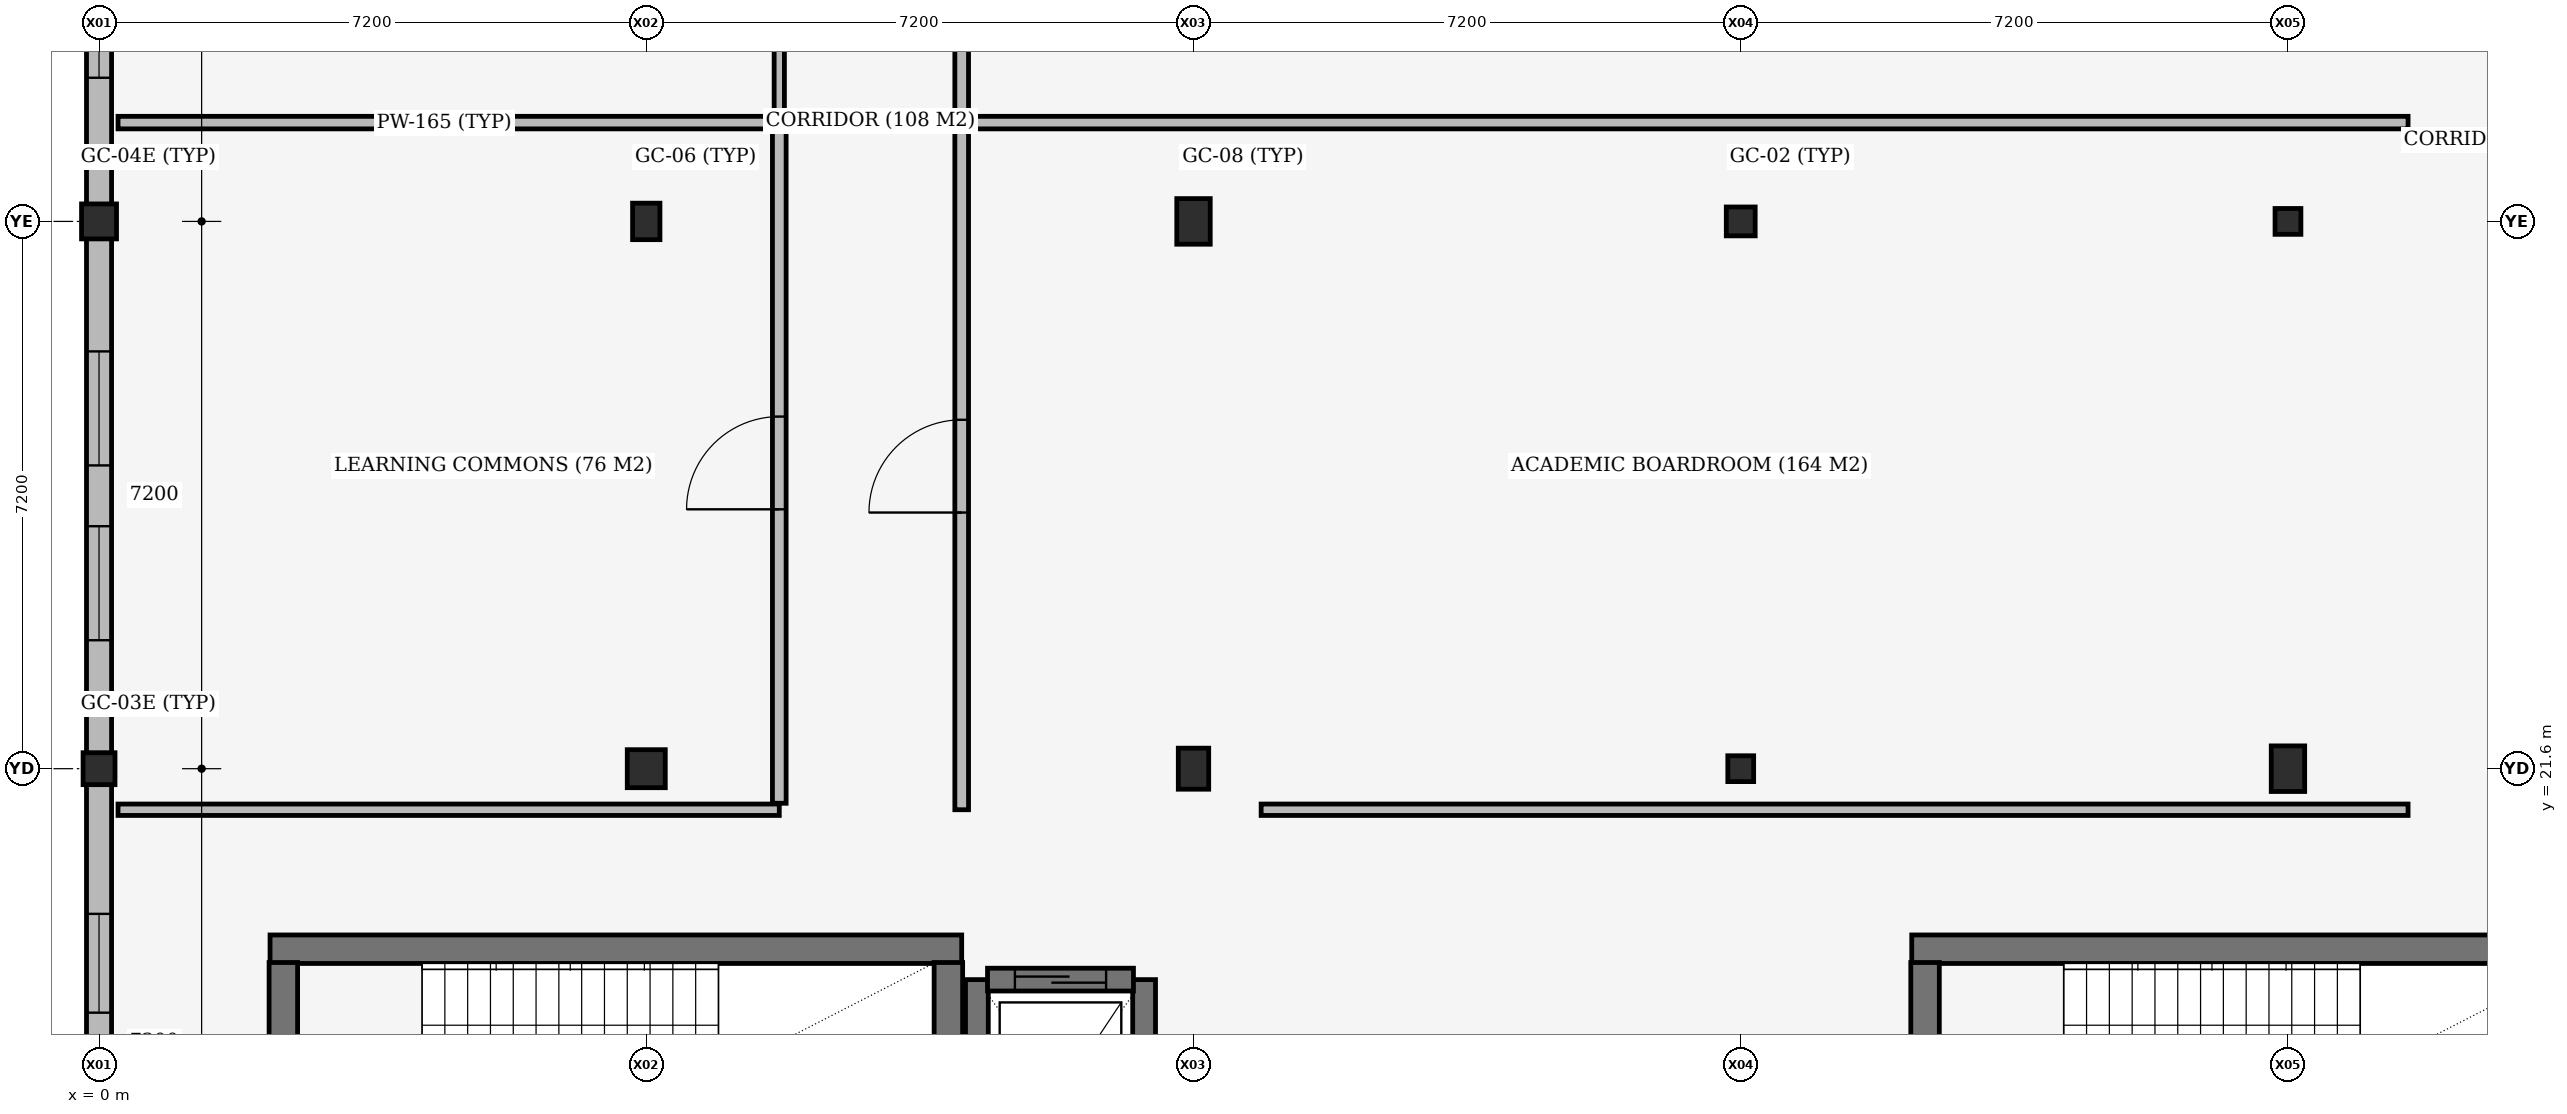
"""IFC4 building model, lengths in metres.
Left out: names, types, materials, properties, quantities, classifications, styles, units other than length and angle.
Written with IfcOpenShell. Run it as: python <this file> out.ifc"""

import sys

from ifc_helpers import new_model, si_unit, direction, frame, frame_2d, origin, origin_2d, place, context, subcontext, project, spatial, rectangle, extrude, element, fill, save


model = new_model("IFC4")
c1 = context("Model", 3, precision=1e-05, world=origin(), true_north=direction((0.0, 1.0)))
c2 = subcontext(c1, "Body", "Model", "MODEL_VIEW")
j1 = project(units=[si_unit("LENGTHUNIT", "METRE"), si_unit("PLANEANGLEUNIT", "RADIAN")], contexts=[c1])
p1 = place(None, origin())
s1 = spatial("IfcSite", under=j1, at=p1, CompositionType="ELEMENT")
p2 = place(p1, origin())
s2 = spatial("IfcBuilding", under=s1, at=p2, CompositionType="ELEMENT")
p3 = place(p2, frame((0.0, 0.0, 18.0)))
s3 = spatial("IfcBuildingStorey", under=s2, at=p3, CompositionType="ELEMENT", Elevation=18.0)
p4 = place(p3, frame((0.0, 21.6, 0.0), z_axis=(0.0, 0.0, 1.0), x_axis=(1.0, 0.0, 0.0)))
e1 = element("IfcColumn", 1, at=p4, inside=s3, PredefinedType="COLUMN", context=c2, shape_type="SweptSolid", body=[
    extrude(rectangle(XDim=0.42, YDim=0.42, at=origin_2d()), origin(), (0.0, 0.0, 1.0), 3.935),
])
p5 = place(p3, frame((0.0, 28.8, 0.0), z_axis=(0.0, 0.0, 1.0), x_axis=(1.0, 0.0, 0.0)))
e2 = element("IfcColumn", 2, at=p5, inside=s3, PredefinedType="COLUMN", context=c2, shape_type="SweptSolid", body=[
    extrude(rectangle(XDim=0.46, YDim=0.46, at=origin_2d()), origin(), (0.0, 0.0, 1.0), 3.935),
])
p6 = place(p3, frame((7.2, 21.6, 0.0), z_axis=(0.0, 0.0, 1.0), x_axis=(1.0, 0.0, 0.0)))
e3 = element("IfcColumn", 3, at=p6, inside=s3, PredefinedType="COLUMN", context=c2, shape_type="SweptSolid", body=[
    extrude(rectangle(XDim=0.5, YDim=0.5, at=origin_2d()), origin(), (0.0, 0.0, 1.0), 3.935),
])
p7 = place(p3, frame((7.2, 28.8, 0.0), z_axis=(0.0, 0.0, 1.0), x_axis=(1.0, 0.0, 0.0)))
e4 = element("IfcColumn", 4, at=p7, inside=s3, PredefinedType="COLUMN", context=c2, shape_type="SweptSolid", body=[
    extrude(rectangle(XDim=0.36, YDim=0.48, at=origin_2d()), origin(), (0.0, 0.0, 1.0), 3.935),
])
p8 = place(p3, frame((14.4, 21.6, 0.0), z_axis=(0.0, 0.0, 1.0), x_axis=(1.0, 0.0, 0.0)))
e5 = element("IfcColumn", 5, at=p8, inside=s3, PredefinedType="COLUMN", context=c2, shape_type="SweptSolid", body=[
    extrude(rectangle(XDim=0.4, YDim=0.54, at=origin_2d()), origin(), (0.0, 0.0, 1.0), 3.935),
])
p9 = place(p3, frame((14.4, 28.8, 0.0), z_axis=(0.0, 0.0, 1.0), x_axis=(1.0, 0.0, 0.0)))
e6 = element("IfcColumn", 6, at=p9, inside=s3, PredefinedType="COLUMN", context=c2, shape_type="SweptSolid", body=[
    extrude(rectangle(XDim=0.44, YDim=0.6, at=origin_2d()), origin(), (0.0, 0.0, 1.0), 3.935),
])
p10 = place(p3, frame((21.6, 21.6, 0.0), z_axis=(0.0, 0.0, 1.0), x_axis=(1.0, 0.0, 0.0)))
e7 = element("IfcColumn", 7, at=p10, inside=s3, PredefinedType="COLUMN", context=c2, shape_type="SweptSolid", body=[
    extrude(rectangle(XDim=0.34, YDim=0.34, at=origin_2d()), origin(), (0.0, 0.0, 1.0), 3.935),
])
p11 = place(p3, frame((21.6, 28.8, 0.0), z_axis=(0.0, 0.0, 1.0), x_axis=(1.0, 0.0, 0.0)))
e8 = element("IfcColumn", 8, at=p11, inside=s3, PredefinedType="COLUMN", context=c2, shape_type="SweptSolid", body=[
    extrude(rectangle(XDim=0.38, YDim=0.38, at=origin_2d()), origin(), (0.0, 0.0, 1.0), 3.935),
])
p12 = place(p3, frame((28.8, 21.6, 0.0), z_axis=(0.0, 0.0, 1.0), x_axis=(1.0, 0.0, 0.0)))
e9 = element("IfcColumn", 9, at=p12, inside=s3, PredefinedType="COLUMN", context=c2, shape_type="SweptSolid", body=[
    extrude(rectangle(XDim=0.44, YDim=0.6, at=origin_2d()), origin(), (0.0, 0.0, 1.0), 3.935),
])
p13 = place(p3, frame((28.8, 28.8, 0.0), z_axis=(0.0, 0.0, 1.0), x_axis=(1.0, 0.0, 0.0)))
e10 = element("IfcColumn", 10, at=p13, inside=s3, PredefinedType="COLUMN", context=c2, shape_type="SweptSolid", body=[
    extrude(rectangle(XDim=0.34, YDim=0.34, at=origin_2d()), origin(), (0.0, 0.0, 1.0), 3.935),
])
p14 = place(p3, frame((11.35, 19.225, 0.0), z_axis=(0.0, 0.0, 1.0), x_axis=(-1.0, 0.0, 0.0)))
e11 = element("IfcWall", 11, at=p14, inside=s3, PredefinedType="SHEAR", context=c2, shape_type="SweptSolid", body=[
    extrude(rectangle(XDim=9.1, YDim=0.375, at=frame_2d((4.55, 0.0))), origin(), (0.0, 0.0, 1.0), 3.935),
])
p15 = place(p3, frame((11.175, 15.6, 0.0), z_axis=(0.0, 0.0, 1.0), x_axis=(0.0, 1.0, 0.0)))
e12 = element("IfcWall", 12, at=p15, inside=s3, PredefinedType="SHEAR", context=c2, shape_type="SweptSolid", body=[
    extrude(rectangle(XDim=3.45, YDim=0.375, at=frame_2d((1.725, 0.0))), origin(), (0.0, 0.0, 1.0), 3.935),
])
p16 = place(p3, frame((32.95, 19.225, 0.0), z_axis=(0.0, 0.0, 1.0), x_axis=(-1.0, 0.0, 0.0)))
e13 = element("IfcWall", 13, at=p16, inside=s3, PredefinedType="SHEAR", context=c2, shape_type="SweptSolid", body=[
    extrude(rectangle(XDim=9.1, YDim=0.375, at=frame_2d((4.55, 0.0))), origin(), (0.0, 0.0, 1.0), 3.935),
])
for number, where, z_axis, x_axis in (
    (14, (11.55, 18.825, 0.0), (0.0, 0.0, 1.0), (0.0, -1.0, 0.0)),
    (15, (13.75, 15.825, 0.0), (0.0, 0.0, 1.0), (0.0, 1.0, 0.0)),
):
    element("IfcWall", number, at=place(p3, frame(where, z_axis=z_axis, x_axis=x_axis)), inside=s3, PredefinedType="SHEAR", context=c2, shape_type="SweptSolid", body=[
        extrude(rectangle(XDim=3.0, YDim=0.3, at=frame_2d((1.5, 0.0))), origin(), (0.0, 0.0, 1.0), 3.935),
    ])
p17 = place(p3, frame((0.0, 14.582, 0.0), z_axis=(0.0, 0.0, 1.0), x_axis=(0.0, 1.0, 0.0)))
e16 = element("IfcWall", 16, at=p17, inside=s3, PredefinedType="STANDARD", context=c2, shape_type="SweptSolid", body=[
    extrude(rectangle(XDim=6.816, YDim=0.33, at=frame_2d((3.408, 0.0))), origin(), (0.0, 0.0, 1.0), 3.295),
])
p18 = place(p17, frame((1.708, 0.0, 0.95)))
e17 = element("IfcOpeningElement", 17, at=p18, cuts=e16, PredefinedType="OPENING", context=c2, shape_type="SweptSolid", body=[
    extrude(rectangle(XDim=1.3, YDim=1.8, at=frame_2d((0.65, 0.9))), frame((0.0, 0.175, 0.0), z_axis=(0.0, -1.0, 0.0), x_axis=(1.0, 0.0, 0.0)), (0.0, 0.0, 1.0), 0.35),
])
p19 = place(p17, frame((3.808, 0.0, 0.95)))
e18 = element("IfcOpeningElement", 18, at=p19, cuts=e16, PredefinedType="OPENING", context=c2, shape_type="SweptSolid", body=[
    extrude(rectangle(XDim=1.3, YDim=1.8, at=frame_2d((0.65, 0.9))), frame((0.0, 0.175, 0.0), z_axis=(0.0, -1.0, 0.0), x_axis=(1.0, 0.0, 0.0)), (0.0, 0.0, 1.0), 0.35),
])
p20 = place(p3, frame((0.0, 21.802, 0.0), z_axis=(0.0, 0.0, 1.0), x_axis=(0.0, 1.0, 0.0)))
e19 = element("IfcWall", 19, at=p20, inside=s3, PredefinedType="STANDARD", context=c2, shape_type="SweptSolid", body=[
    extrude(rectangle(XDim=6.776, YDim=0.33, at=frame_2d((3.388, 0.0))), origin(), (0.0, 0.0, 1.0), 3.255),
])
p21 = place(p20, frame((1.488, 0.0, 0.95)))
e20 = element("IfcOpeningElement", 20, at=p21, cuts=e19, PredefinedType="OPENING", context=c2, shape_type="SweptSolid", body=[
    extrude(rectangle(XDim=1.5, YDim=1.8, at=frame_2d((0.75, 0.9))), frame((0.0, 0.175, 0.0), z_axis=(0.0, -1.0, 0.0), x_axis=(1.0, 0.0, 0.0)), (0.0, 0.0, 1.0), 0.35),
])
p22 = place(p20, frame((3.788, 0.0, 0.95)))
e21 = element("IfcOpeningElement", 21, at=p22, cuts=e19, PredefinedType="OPENING", context=c2, shape_type="SweptSolid", body=[
    extrude(rectangle(XDim=1.5, YDim=1.8, at=frame_2d((0.75, 0.9))), frame((0.0, 0.175, 0.0), z_axis=(0.0, -1.0, 0.0), x_axis=(1.0, 0.0, 0.0)), (0.0, 0.0, 1.0), 0.35),
])
p23 = place(p3, frame((0.0, 29.022, 0.0), z_axis=(0.0, 0.0, 1.0), x_axis=(0.0, 1.0, 0.0)))
e22 = element("IfcWall", 22, at=p23, inside=s3, PredefinedType="STANDARD", context=c2, shape_type="SweptSolid", body=[
    extrude(rectangle(XDim=6.736, YDim=0.33, at=frame_2d((3.368, 0.0))), origin(), (0.0, 0.0, 1.0), 3.195),
])
p24 = place(p23, frame((1.668, 0.0, 0.95)))
e23 = element("IfcOpeningElement", 23, at=p24, cuts=e22, PredefinedType="OPENING", context=c2, shape_type="SweptSolid", body=[
    extrude(rectangle(XDim=1.3, YDim=1.8, at=frame_2d((0.65, 0.9))), frame((0.0, 0.175, 0.0), z_axis=(0.0, -1.0, 0.0), x_axis=(1.0, 0.0, 0.0)), (0.0, 0.0, 1.0), 0.35),
])
p25 = place(p23, frame((3.768, 0.0, 0.95)))
e24 = element("IfcOpeningElement", 24, at=p25, cuts=e22, PredefinedType="OPENING", context=c2, shape_type="SweptSolid", body=[
    extrude(rectangle(XDim=1.3, YDim=1.8, at=frame_2d((0.65, 0.9))), frame((0.0, 0.175, 0.0), z_axis=(0.0, -1.0, 0.0), x_axis=(1.0, 0.0, 0.0)), (0.0, 0.0, 1.0), 0.35),
])
p26 = place(p3, frame((2.425, 19.05, 0.0), z_axis=(0.0, 0.0, 1.0), x_axis=(0.0, -1.0, 0.0)))
e25 = element("IfcWall", 25, at=p26, inside=s3, PredefinedType="SHEAR", context=c2, shape_type="SweptSolid", body=[
    extrude(rectangle(XDim=3.45, YDim=0.375, at=frame_2d((1.725, 0.0))), origin(), (0.0, 0.0, 1.0), 3.935),
])
p27 = place(p26, frame((1.035, 0.0, 0.0)))
e26 = element("IfcOpeningElement", 26, at=p27, cuts=e25, PredefinedType="OPENING", context=c2, shape_type="SweptSolid", body=[
    extrude(rectangle(XDim=1.38, YDim=2.2, at=frame_2d((0.69, 1.1))), frame((0.0, 0.198, 0.0), z_axis=(0.0, -1.0, 0.0), x_axis=(1.0, 0.0, 0.0)), (0.0, 0.0, 1.0), 0.395),
])
p28 = place(p3, frame((24.025, 19.05, 0.0), z_axis=(0.0, 0.0, 1.0), x_axis=(0.0, -1.0, 0.0)))
e27 = element("IfcWall", 27, at=p28, inside=s3, PredefinedType="SHEAR", context=c2, shape_type="SweptSolid", body=[
    extrude(rectangle(XDim=3.45, YDim=0.375, at=frame_2d((1.725, 0.0))), origin(), (0.0, 0.0, 1.0), 3.935),
])
p29 = place(p28, frame((1.035, 0.0, 0.0)))
e28 = element("IfcOpeningElement", 28, at=p29, cuts=e27, PredefinedType="OPENING", context=c2, shape_type="SweptSolid", body=[
    extrude(rectangle(XDim=1.38, YDim=2.2, at=frame_2d((0.69, 1.1))), frame((0.0, 0.198, 0.0), z_axis=(0.0, -1.0, 0.0), x_axis=(1.0, 0.0, 0.0)), (0.0, 0.0, 1.0), 0.395),
])
p30 = place(p3, frame((11.69, 18.825, 0.0), z_axis=(0.0, 0.0, 1.0), x_axis=(1.0, 0.0, 0.0)))
e29 = element("IfcWall", 29, at=p30, inside=s3, PredefinedType="SHEAR", context=c2, shape_type="SweptSolid", body=[
    extrude(rectangle(XDim=1.92, YDim=0.3, at=frame_2d((0.96, 0.0))), origin(), (0.0, 0.0, 1.0), 3.935),
])
p31 = place(p30, frame((0.36, 0.0, 0.0)))
e30 = element("IfcOpeningElement", 30, at=p31, cuts=e29, PredefinedType="OPENING", context=c2, shape_type="SweptSolid", body=[
    extrude(rectangle(XDim=1.2, YDim=2.1, at=frame_2d((0.6, 1.05))), frame((0.0, 0.16, 0.0), z_axis=(0.0, -1.0, 0.0), x_axis=(1.0, 0.0, 0.0)), (0.0, 0.0, 1.0), 0.32),
])
p32 = place(p3, frame((0.25, 21.06, 0.0), z_axis=(0.0, 0.0, 1.0), x_axis=(1.0, 0.0, 0.0)))
e31 = element("IfcWall", 31, at=p32, inside=s3, PredefinedType="PARTITIONING", context=c2, shape_type="SweptSolid", body=[
    extrude(rectangle(XDim=8.7, YDim=0.15, at=frame_2d((4.35, 0.0))), origin(), (0.0, 0.0, 1.0), 3.485),
])
p33 = place(p3, frame((8.95, 21.145, 0.0), z_axis=(0.0, 0.0, 1.0), x_axis=(0.0, 1.0, 0.0)))
e32 = element("IfcWall", 32, at=p33, inside=s3, PredefinedType="PARTITIONING", context=c2, shape_type="SweptSolid", body=[
    extrude(rectangle(XDim=8.955, YDim=0.18, at=frame_2d((4.478, 0.0))), origin(), (0.0, 0.0, 1.0), 3.255),
])
p34 = place(p33, frame((3.867, 0.0, 0.0)))
e33 = element("IfcOpeningElement", 33, at=p34, cuts=e32, PredefinedType="OPENING", context=c2, shape_type="SweptSolid", body=[
    extrude(rectangle(XDim=1.22, YDim=2.25, at=frame_2d((0.61, 1.125))), frame((0.0, 0.1, 0.0), z_axis=(0.0, -1.0, 0.0), x_axis=(1.0, 0.0, 0.0)), (0.0, 0.0, 1.0), 0.2),
])
p35 = place(p3, frame((0.25, 30.1, 0.0), z_axis=(0.0, 0.0, 1.0), x_axis=(1.0, 0.0, 0.0)))
e34 = element("IfcWall", 34, at=p35, inside=s3, PredefinedType="PARTITIONING", context=c2, shape_type="SweptSolid", body=[
    extrude(rectangle(XDim=8.58, YDim=0.165, at=frame_2d((4.29, 0.0))), origin(), (0.0, 0.0, 1.0), 3.415),
])
p36 = place(p3, frame((8.95, 30.105, 0.0), z_axis=(0.0, 0.0, 1.0), x_axis=(0.0, 1.0, 0.0)))
e35 = element("IfcWall", 35, at=p36, inside=s3, PredefinedType="PARTITIONING", context=c2, shape_type="SweptSolid", body=[
    extrude(rectangle(XDim=3.09, YDim=0.135, at=frame_2d((1.545, 0.0))), origin(), (0.0, 0.0, 1.0), 3.935),
])
p37 = place(p36, frame((0.965, 0.0, 0.0)))
e36 = element("IfcOpeningElement", 36, at=p37, cuts=e35, PredefinedType="OPENING", context=c2, shape_type="SweptSolid", body=[
    extrude(rectangle(XDim=1.16, YDim=2.2, at=frame_2d((0.58, 1.1))), frame((0.0, 0.077, 0.0), z_axis=(0.0, -1.0, 0.0), x_axis=(1.0, 0.0, 0.0)), (0.0, 0.0, 1.0), 0.155),
])
p38 = place(p3, frame((11.35, 21.06, 0.0), z_axis=(0.0, 0.0, 1.0), x_axis=(0.0, 1.0, 0.0)))
e37 = element("IfcWall", 37, at=p38, inside=s3, PredefinedType="PARTITIONING", context=c2, shape_type="SweptSolid", body=[
    extrude(rectangle(XDim=9.04, YDim=0.18, at=frame_2d((4.52, 0.0))), origin(), (0.0, 0.0, 1.0), 3.255),
])
p39 = place(p38, frame((3.91, 0.0, 0.0)))
e38 = element("IfcOpeningElement", 38, at=p39, cuts=e37, PredefinedType="OPENING", context=c2, shape_type="SweptSolid", body=[
    extrude(rectangle(XDim=1.22, YDim=2.25, at=frame_2d((0.61, 1.125))), frame((0.0, 0.1, 0.0), z_axis=(0.0, -1.0, 0.0), x_axis=(1.0, 0.0, 0.0)), (0.0, 0.0, 1.0), 0.2),
])
p40 = place(p3, frame((15.29, 21.06, 0.0), z_axis=(0.0, 0.0, 1.0), x_axis=(1.0, 0.0, 0.0)))
e39 = element("IfcWall", 39, at=p40, inside=s3, PredefinedType="PARTITIONING", context=c2, shape_type="SweptSolid", body=[
    extrude(rectangle(XDim=15.09, YDim=0.15, at=frame_2d((7.545, 0.0))), origin(), (0.0, 0.0, 1.0), 3.295),
])
p41 = place(p3, frame((11.47, 30.1, 0.0), z_axis=(0.0, 0.0, 1.0), x_axis=(1.0, 0.0, 0.0)))
e40 = element("IfcWall", 40, at=p41, inside=s3, PredefinedType="PARTITIONING", context=c2, shape_type="SweptSolid", body=[
    extrude(rectangle(XDim=18.91, YDim=0.165, at=frame_2d((9.455, 0.0))), origin(), (0.0, 0.0, 1.0), 3.195),
])
p42 = place(p3, frame((11.35, 30.105, 0.0), z_axis=(0.0, 0.0, 1.0), x_axis=(0.0, 1.0, 0.0)))
e41 = element("IfcWall", 41, at=p42, inside=s3, PredefinedType="PARTITIONING", context=c2, shape_type="SweptSolid", body=[
    extrude(rectangle(XDim=11.295, YDim=0.18, at=frame_2d((5.647, 0.0))), origin(), (0.0, 0.0, 1.0), 3.255),
])
p43 = place(p42, frame((5.028, 0.0, 0.0)))
e42 = element("IfcOpeningElement", 42, at=p43, cuts=e41, PredefinedType="OPENING", context=c2, shape_type="SweptSolid", body=[
    extrude(rectangle(XDim=1.24, YDim=2.25, at=frame_2d((0.62, 1.125))), frame((0.0, 0.1, 0.0), z_axis=(0.0, -1.0, 0.0), x_axis=(1.0, 0.0, 0.0)), (0.0, 0.0, 1.0), 0.2),
])
p44 = place(p19, origin())
e43 = element("IfcWindow", 43, at=p44, inside=s3, PartitioningType="DOUBLE_PANEL_VERTICAL", PredefinedType="WINDOW", context=c2, shape_type="SweptSolid", body=[
    extrude(rectangle(XDim=1.3, YDim=1.8, at=frame_2d((0.65, 0.9))), frame((0.0, 0.03, 0.0), z_axis=(0.0, -1.0, 0.0), x_axis=(1.0, 0.0, 0.0)), (0.0, 0.0, 1.0), 0.06),
])
fill(e18, e43)
p45 = place(p21, origin())
e44 = element("IfcWindow", 44, at=p45, inside=s3, PartitioningType="DOUBLE_PANEL_VERTICAL", PredefinedType="WINDOW", context=c2, shape_type="SweptSolid", body=[
    extrude(rectangle(XDim=1.5, YDim=1.8, at=frame_2d((0.75, 0.9))), frame((0.0, 0.03, 0.0), z_axis=(0.0, -1.0, 0.0), x_axis=(1.0, 0.0, 0.0)), (0.0, 0.0, 1.0), 0.06),
])
fill(e20, e44)
p46 = place(p22, origin())
e45 = element("IfcWindow", 45, at=p46, inside=s3, PartitioningType="DOUBLE_PANEL_VERTICAL", PredefinedType="WINDOW", context=c2, shape_type="SweptSolid", body=[
    extrude(rectangle(XDim=1.5, YDim=1.8, at=frame_2d((0.75, 0.9))), frame((0.0, 0.03, 0.0), z_axis=(0.0, -1.0, 0.0), x_axis=(1.0, 0.0, 0.0)), (0.0, 0.0, 1.0), 0.06),
])
fill(e21, e45)
p47 = place(p24, origin())
e46 = element("IfcWindow", 46, at=p47, inside=s3, PartitioningType="DOUBLE_PANEL_VERTICAL", PredefinedType="WINDOW", context=c2, shape_type="SweptSolid", body=[
    extrude(rectangle(XDim=1.3, YDim=1.8, at=frame_2d((0.65, 0.9))), frame((0.0, 0.03, 0.0), z_axis=(0.0, -1.0, 0.0), x_axis=(1.0, 0.0, 0.0)), (0.0, 0.0, 1.0), 0.06),
])
fill(e23, e46)
p48 = place(p31, origin())
e47 = element("IfcDoor", 47, at=p48, inside=s3, OperationType="SLIDING_TO_LEFT", PredefinedType="DOOR", context=c2, shape_type="SweptSolid", body=[
    extrude(rectangle(XDim=1.2, YDim=2.1, at=frame_2d((0.6, 1.05))), frame((0.0, 0.025, 0.0), z_axis=(0.0, -1.0, 0.0), x_axis=(1.0, 0.0, 0.0)), (0.0, 0.0, 1.0), 0.05),
])
fill(e30, e47)
p49 = place(p34, origin())
e48 = element("IfcDoor", 48, at=p49, inside=s3, OperationType="SINGLE_SWING_LEFT", PredefinedType="DOOR", context=c2, shape_type="SweptSolid", body=[
    extrude(rectangle(XDim=1.22, YDim=2.25, at=frame_2d((0.61, 1.125))), frame((0.0, 0.025, 0.0), z_axis=(0.0, -1.0, 0.0), x_axis=(1.0, 0.0, 0.0)), (0.0, 0.0, 1.0), 0.05),
])
fill(e33, e48)
p50 = place(p39, origin())
e49 = element("IfcDoor", 49, at=p50, inside=s3, OperationType="SINGLE_SWING_LEFT", PredefinedType="DOOR", context=c2, shape_type="SweptSolid", body=[
    extrude(rectangle(XDim=1.22, YDim=2.25, at=frame_2d((0.61, 1.125))), frame((0.0, 0.025, 0.0), z_axis=(0.0, -1.0, 0.0), x_axis=(1.0, 0.0, 0.0)), (0.0, 0.0, 1.0), 0.05),
])
fill(e38, e49)
save(model, sys.argv[1])
